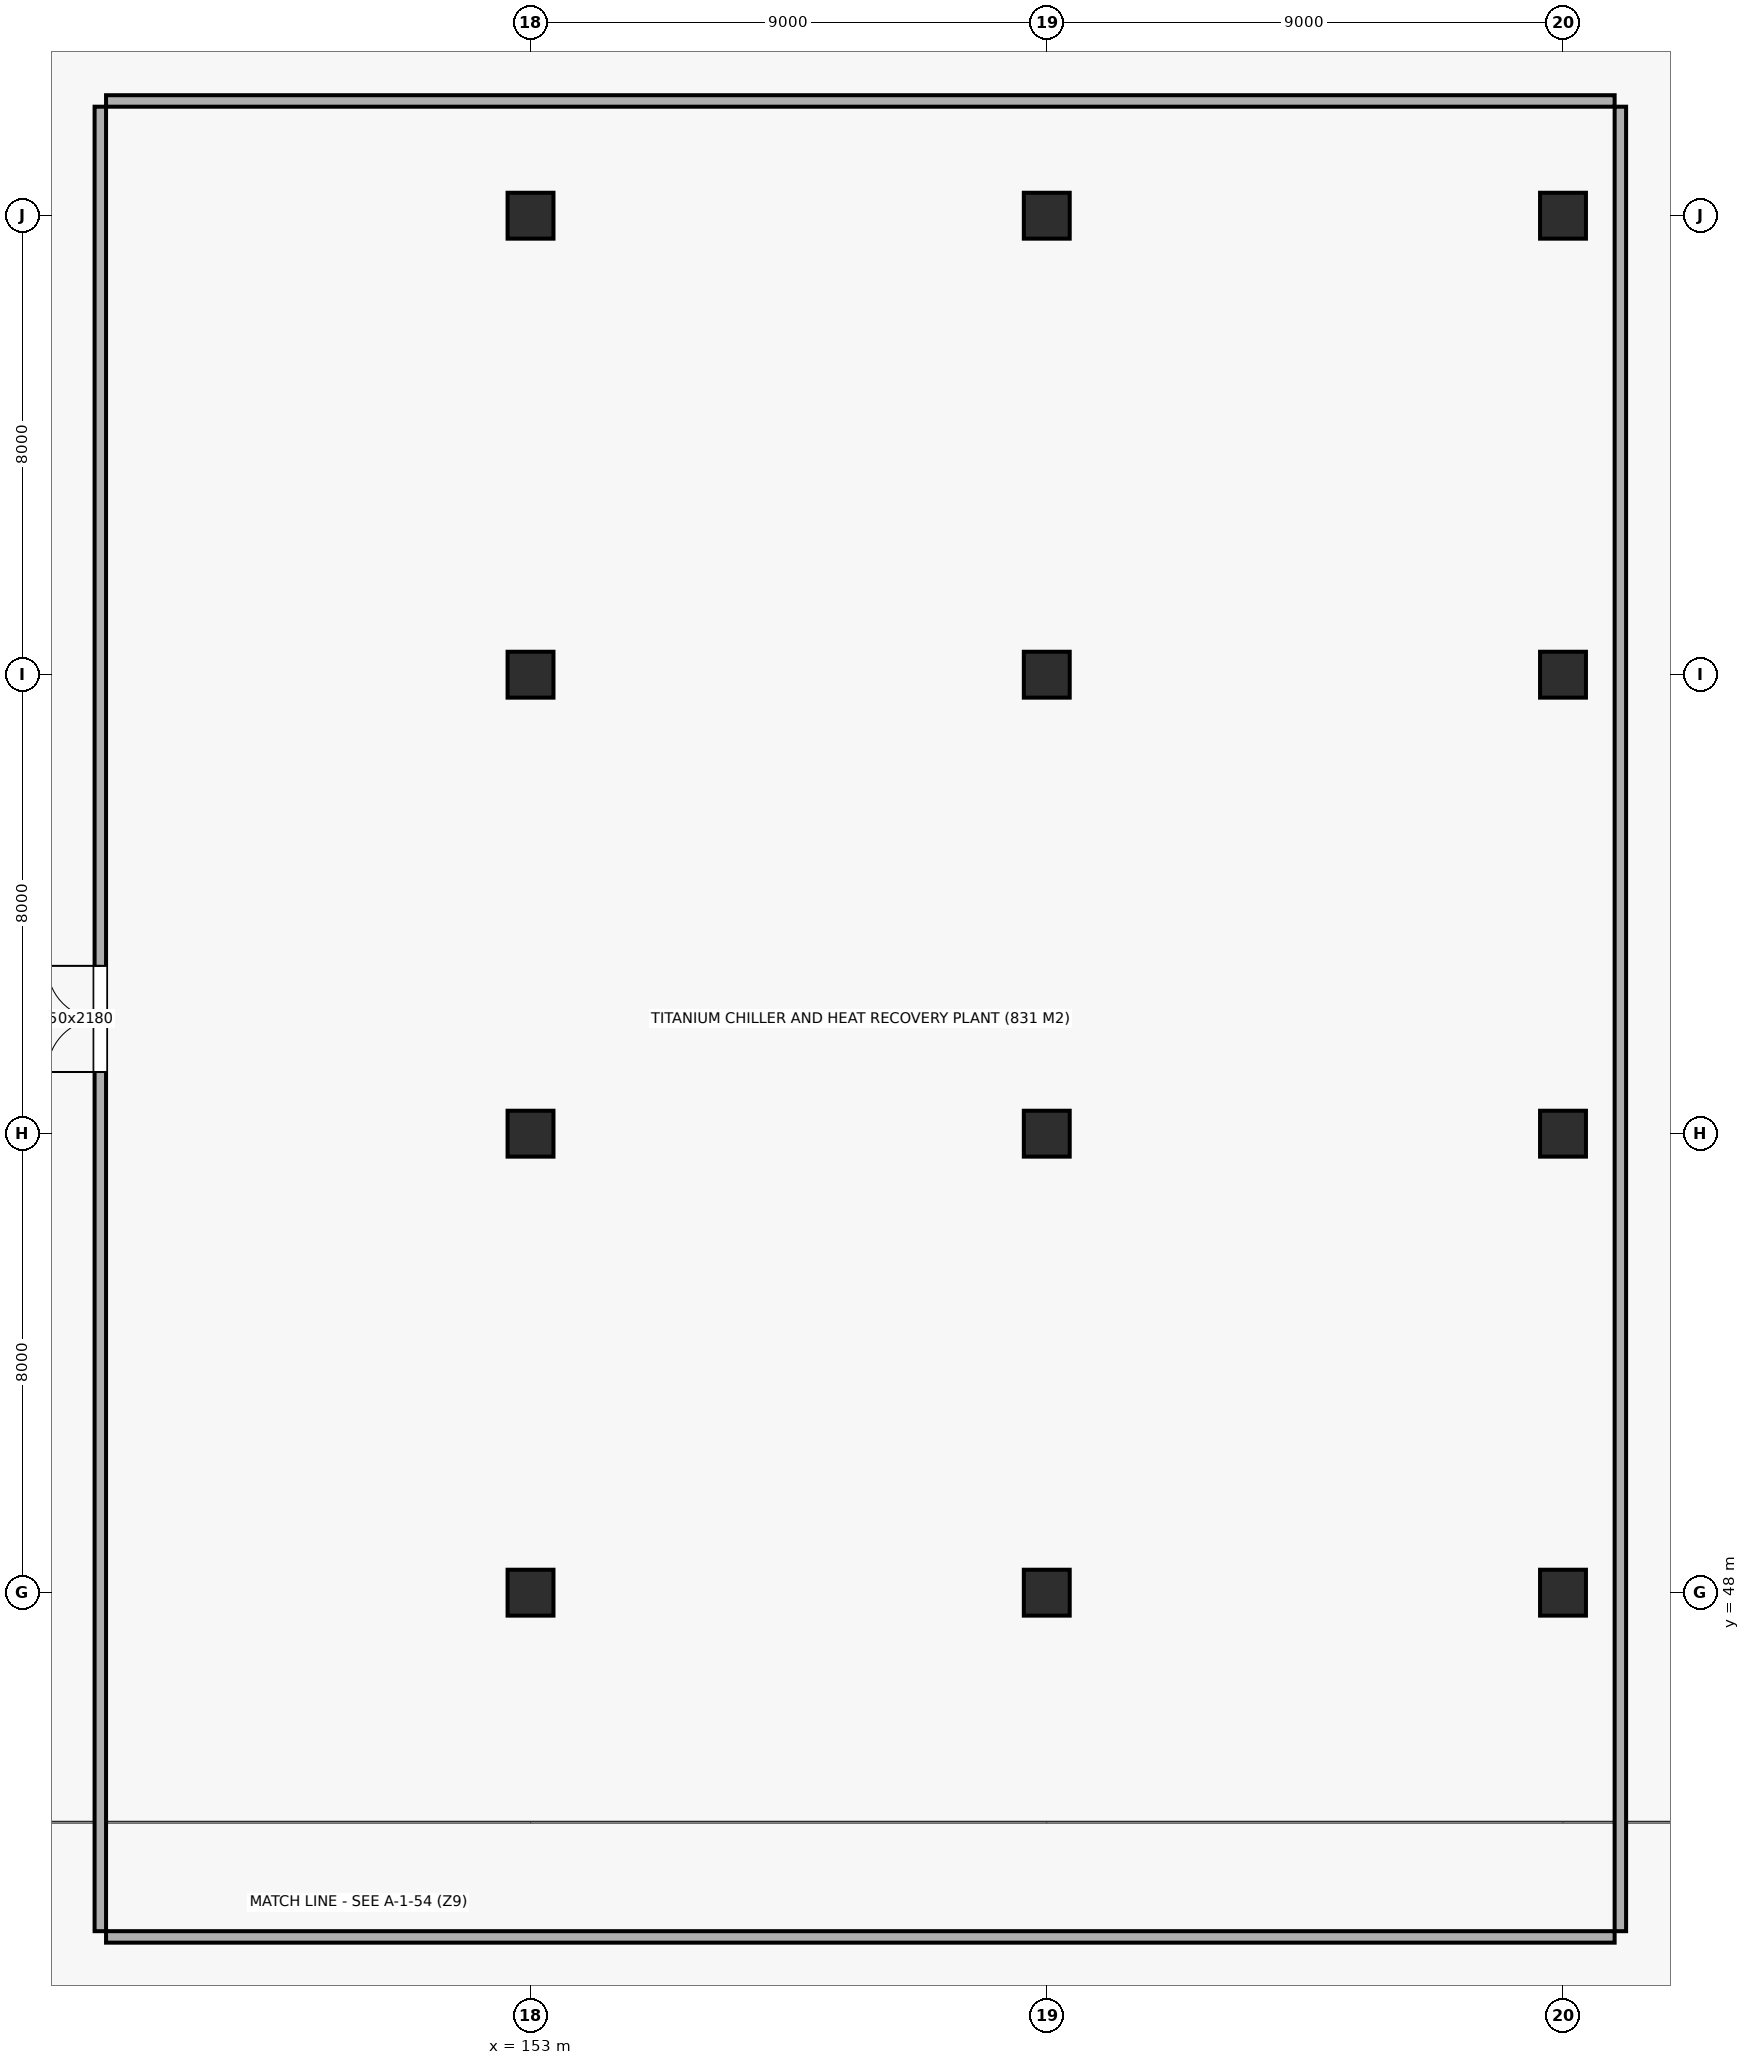
"""IFC4 building model, lengths in metres.
Left out: names, types, materials, properties, quantities, classifications, styles, units other than length and angle.
Written with IfcOpenShell. Run it as: python <this file> out.ifc"""

import sys

from ifc_helpers import new_model, si_unit, direction, frame, frame_2d, origin, origin_2d, place, context, subcontext, project, spatial, rectangle, extrude, element, fill, save


model = new_model("IFC4")
c1 = context("Model", 3, precision=1e-05, world=origin(), true_north=direction((0.0, 1.0)))
c2 = subcontext(c1, "Body", "Model", "MODEL_VIEW")
j1 = project(units=[si_unit("LENGTHUNIT", "METRE"), si_unit("PLANEANGLEUNIT", "RADIAN")], contexts=[c1])
p1 = place(None, origin())
s1 = spatial("IfcSite", under=j1, at=p1, CompositionType="ELEMENT")
p2 = place(p1, origin())
s2 = spatial("IfcBuilding", under=s1, at=p2, CompositionType="ELEMENT")
p3 = place(p2, frame((0.0, 0.0, 13.5)))
s3 = spatial("IfcBuildingStorey", under=s2, at=p3, CompositionType="ELEMENT", Elevation=13.5)
for number, where, z_axis, x_axis in (
    (1, (153.0, 48.0, 0.0), (0.0, 0.0, 1.0), (1.0, 0.0, 0.0)),
    (2, (153.0, 56.0, 0.0), (0.0, 0.0, 1.0), (1.0, 0.0, 0.0)),
    (3, (153.0, 64.0, 0.0), (0.0, 0.0, 1.0), (1.0, 0.0, 0.0)),
    (4, (153.0, 72.0, 0.0), (0.0, 0.0, 1.0), (1.0, 0.0, 0.0)),
    (5, (162.0, 48.0, 0.0), (0.0, 0.0, 1.0), (1.0, 0.0, 0.0)),
    (6, (162.0, 56.0, 0.0), (0.0, 0.0, 1.0), (1.0, 0.0, 0.0)),
    (7, (162.0, 64.0, 0.0), (0.0, 0.0, 1.0), (1.0, 0.0, 0.0)),
    (8, (162.0, 72.0, 0.0), (0.0, 0.0, 1.0), (1.0, 0.0, 0.0)),
    (9, (171.0, 48.0, 0.0), (0.0, 0.0, 1.0), (1.0, 0.0, 0.0)),
    (10, (171.0, 56.0, 0.0), (0.0, 0.0, 1.0), (1.0, 0.0, 0.0)),
    (11, (171.0, 64.0, 0.0), (0.0, 0.0, 1.0), (1.0, 0.0, 0.0)),
    (12, (171.0, 72.0, 0.0), (0.0, 0.0, 1.0), (1.0, 0.0, 0.0)),
):
    element("IfcColumn", number, at=place(p3, frame(where, z_axis=z_axis, x_axis=x_axis)), inside=s3, PredefinedType="COLUMN", context=c2, shape_type="SweptSolid", body=[
        extrude(rectangle(XDim=0.8, YDim=0.8, at=origin_2d()), origin(), (0.0, 0.0, 1.0), 4.2),
    ])
for number, where, z_axis, x_axis in (
    (13, (145.6, 42.0, 0.0), (0.0, 0.0, 1.0), (1.0, 0.0, 0.0)),
    (14, (145.6, 74.0, 0.0), (0.0, 0.0, 1.0), (1.0, 0.0, 0.0)),
):
    element("IfcWall", number, at=place(p3, frame(where, z_axis=z_axis, x_axis=x_axis)), inside=s3, PredefinedType="PARTITIONING", context=c2, shape_type="SweptSolid", body=[
        extrude(rectangle(XDim=26.3, YDim=0.2, at=frame_2d((13.15, 0.0))), origin(), (0.0, 0.0, 1.0), 4.2),
    ])
p4 = place(p3, frame((145.5, 42.1, 0.0), z_axis=(0.0, 0.0, 1.0), x_axis=(0.0, 1.0, 0.0)))
e15 = element("IfcWall", 15, at=p4, inside=s3, PredefinedType="PARTITIONING", context=c2, shape_type="SweptSolid", body=[
    extrude(rectangle(XDim=31.8, YDim=0.2, at=frame_2d((15.9, 0.0))), origin(), (0.0, 0.0, 1.0), 4.2),
])
p5 = place(p4, frame((14.975, 0.0, 0.0)))
e16 = element("IfcOpeningElement", 16, at=p5, cuts=e15, PredefinedType="OPENING", context=c2, shape_type="SweptSolid", body=[
    extrude(rectangle(XDim=1.85, YDim=2.18, at=frame_2d((0.925, 1.09))), frame((0.0, 0.112, 0.0), z_axis=(0.0, -1.0, 0.0), x_axis=(1.0, 0.0, 0.0)), (0.0, 0.0, 1.0), 0.224),
])
p6 = place(p3, frame((172.0, 42.1, 0.0), z_axis=(0.0, 0.0, 1.0), x_axis=(0.0, 1.0, 0.0)))
e17 = element("IfcWall", 17, at=p6, inside=s3, PredefinedType="PARTITIONING", context=c2, shape_type="SweptSolid", body=[
    extrude(rectangle(XDim=31.8, YDim=0.2, at=frame_2d((15.9, 0.0))), origin(), (0.0, 0.0, 1.0), 4.2),
])
p7 = place(p5, origin())
e18 = element("IfcDoor", 18, at=p7, inside=s3, OperationType="DOUBLE_DOOR_SINGLE_SWING", PredefinedType="DOOR", context=c2, shape_type="SweptSolid", body=[
    extrude(rectangle(XDim=1.85, YDim=2.18, at=frame_2d((0.925, 1.09))), frame((0.0, 0.025, 0.0), z_axis=(0.0, -1.0, 0.0), x_axis=(1.0, 0.0, 0.0)), (0.0, 0.0, 1.0), 0.05),
])
fill(e16, e18)
save(model, sys.argv[1])
